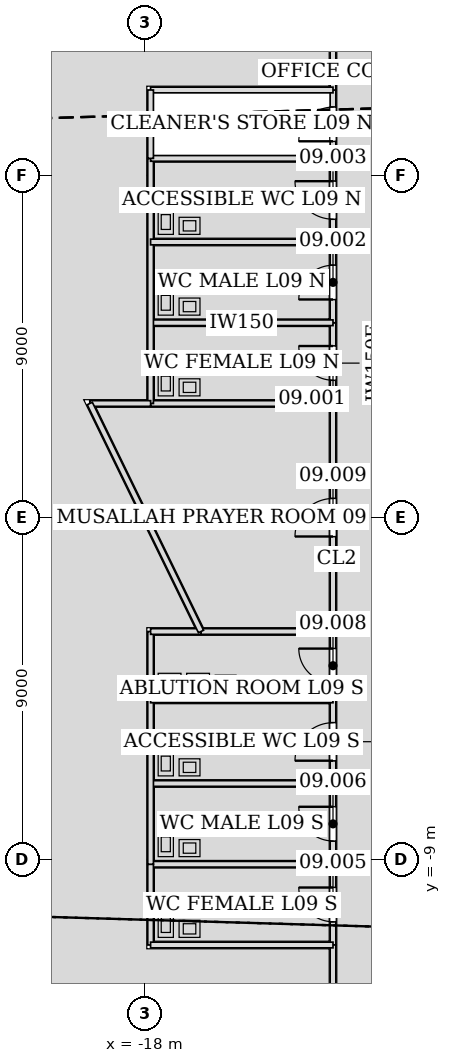
"""IFC4 building model, lengths in metres.
Left out: names, types, materials, properties, quantities, classifications, styles, units other than length and angle.
Written with IfcOpenShell. Run it as: python <this file> out.ifc"""

import sys

from ifc_helpers import new_model, si_unit, direction, frame, frame_2d, origin, place, context, subcontext, project, spatial, rectangle, extrude, element, fill, save


model = new_model("IFC4")
c1 = context("Model", 3, precision=1e-05, world=origin(), true_north=direction((0.0, 1.0)))
c2 = subcontext(c1, "Body", "Model", "MODEL_VIEW")
j1 = project(units=[si_unit("LENGTHUNIT", "METRE"), si_unit("PLANEANGLEUNIT", "RADIAN")], contexts=[c1])
p1 = place(None, origin())
s1 = spatial("IfcSite", under=j1, at=p1, CompositionType="ELEMENT")
p2 = place(p1, origin())
s2 = spatial("IfcBuilding", under=s1, at=p2, CompositionType="ELEMENT")
p3 = place(p2, frame((0.0, 0.0, 45.6)))
s3 = spatial("IfcBuildingStorey", under=s2, at=p3, CompositionType="ELEMENT", Elevation=45.6)
p4 = place(p3, frame((-13.05, 5.126, 0.0), z_axis=(0.0, 0.0, 1.0), x_axis=(0.0, -1.0, 0.0)))
e1 = element("IfcWall", 1, at=p4, inside=s3, PredefinedType="PARTITIONING", context=c2, shape_type="SweptSolid", body=[
    extrude(rectangle(XDim=2.127, YDim=0.15, at=frame_2d((1.063, 0.0))), origin(), (0.0, 0.0, 1.0), 4.035),
])
p5 = place(p4, frame((0.614, 0.0, 0.0)))
e2 = element("IfcOpeningElement", 2, at=p5, cuts=e1, PredefinedType="OPENING", context=c2, shape_type="SweptSolid", body=[
    extrude(rectangle(XDim=0.9, YDim=2.1, at=frame_2d((0.45, 1.05))), frame((0.0, 0.085, 0.0), z_axis=(0.0, -1.0, 0.0), x_axis=(1.0, 0.0, 0.0)), (0.0, 0.0, 1.0), 0.17),
])
p6 = place(p3, frame((-13.05, 7.251, 0.0), z_axis=(0.0, 0.0, 1.0), x_axis=(0.0, -1.0, 0.0)))
e3 = element("IfcWall", 3, at=p6, inside=s3, PredefinedType="PARTITIONING", context=c2, shape_type="SweptSolid", body=[
    extrude(rectangle(XDim=2.127, YDim=0.15, at=frame_2d((1.063, 0.0))), origin(), (0.0, 0.0, 1.0), 4.035),
])
p7 = place(p6, frame((0.614, 0.0, 0.0)))
e4 = element("IfcOpeningElement", 4, at=p7, cuts=e3, PredefinedType="OPENING", context=c2, shape_type="SweptSolid", body=[
    extrude(rectangle(XDim=0.9, YDim=2.1, at=frame_2d((0.45, 1.05))), frame((0.0, 0.085, 0.0), z_axis=(0.0, -1.0, 0.0), x_axis=(1.0, 0.0, 0.0)), (0.0, 0.0, 1.0), 0.17),
])
p8 = place(p3, frame((-13.05, 9.451, 0.0), z_axis=(0.0, 0.0, 1.0), x_axis=(0.0, -1.0, 0.0)))
e5 = element("IfcWall", 5, at=p8, inside=s3, PredefinedType="PARTITIONING", context=c2, shape_type="SweptSolid", body=[
    extrude(rectangle(XDim=2.202, YDim=0.15, at=frame_2d((1.101, 0.0))), origin(), (0.0, 0.0, 1.0), 4.035),
])
p9 = place(p8, frame((0.601, 0.0, 0.0)))
e6 = element("IfcOpeningElement", 6, at=p9, cuts=e5, PredefinedType="OPENING", context=c2, shape_type="SweptSolid", body=[
    extrude(rectangle(XDim=1.0, YDim=2.1, at=frame_2d((0.5, 1.05))), frame((0.0, 0.085, 0.0), z_axis=(0.0, -1.0, 0.0), x_axis=(1.0, 0.0, 0.0)), (0.0, 0.0, 1.0), 0.17),
])
p10 = place(p3, frame((-13.05, 11.251, 0.0), z_axis=(0.0, 0.0, 1.0), x_axis=(0.0, -1.0, 0.0)))
e7 = element("IfcWall", 7, at=p10, inside=s3, PredefinedType="PARTITIONING", context=c2, shape_type="SweptSolid", body=[
    extrude(rectangle(XDim=1.802, YDim=0.15, at=frame_2d((0.901, 0.0))), origin(), (0.0, 0.0, 1.0), 3.014),
])
p11 = place(p10, frame((0.451, 0.0, 0.0)))
e8 = element("IfcOpeningElement", 8, at=p11, cuts=e7, PredefinedType="OPENING", context=c2, shape_type="SweptSolid", body=[
    extrude(rectangle(XDim=0.9, YDim=2.1, at=frame_2d((0.45, 1.05))), frame((0.0, 0.085, 0.0), z_axis=(0.0, -1.0, 0.0), x_axis=(1.0, 0.0, 0.0)), (0.0, 0.0, 1.0), 0.17),
])
p12 = place(p3, frame((-13.05, -9.124, 0.0), z_axis=(0.0, 0.0, 1.0), x_axis=(0.0, -1.0, 0.0)))
e9 = element("IfcWall", 9, at=p12, inside=s3, PredefinedType="PARTITIONING", context=c2, shape_type="SweptSolid", body=[
    extrude(rectangle(XDim=2.127, YDim=0.15, at=frame_2d((1.063, 0.0))), origin(), (0.0, 0.0, 1.0), 3.014),
])
p13 = place(p12, frame((0.614, 0.0, 0.0)))
e10 = element("IfcOpeningElement", 10, at=p13, cuts=e9, PredefinedType="OPENING", context=c2, shape_type="SweptSolid", body=[
    extrude(rectangle(XDim=0.9, YDim=2.1, at=frame_2d((0.45, 1.05))), frame((0.0, 0.085, 0.0), z_axis=(0.0, -1.0, 0.0), x_axis=(1.0, 0.0, 0.0)), (0.0, 0.0, 1.0), 0.17),
])
p14 = place(p3, frame((-13.05, -6.999, 0.0), z_axis=(0.0, 0.0, 1.0), x_axis=(0.0, -1.0, 0.0)))
e11 = element("IfcWall", 11, at=p14, inside=s3, PredefinedType="PARTITIONING", context=c2, shape_type="SweptSolid", body=[
    extrude(rectangle(XDim=2.127, YDim=0.15, at=frame_2d((1.063, 0.0))), origin(), (0.0, 0.0, 1.0), 4.035),
])
p15 = place(p14, frame((0.614, 0.0, 0.0)))
e12 = element("IfcOpeningElement", 12, at=p15, cuts=e11, PredefinedType="OPENING", context=c2, shape_type="SweptSolid", body=[
    extrude(rectangle(XDim=0.9, YDim=2.1, at=frame_2d((0.45, 1.05))), frame((0.0, 0.085, 0.0), z_axis=(0.0, -1.0, 0.0), x_axis=(1.0, 0.0, 0.0)), (0.0, 0.0, 1.0), 0.17),
])
p16 = place(p3, frame((-13.05, -4.799, 0.0), z_axis=(0.0, 0.0, 1.0), x_axis=(0.0, -1.0, 0.0)))
e13 = element("IfcWall", 13, at=p16, inside=s3, PredefinedType="PARTITIONING", context=c2, shape_type="SweptSolid", body=[
    extrude(rectangle(XDim=2.202, YDim=0.15, at=frame_2d((1.101, 0.0))), origin(), (0.0, 0.0, 1.0), 4.035),
])
p17 = place(p16, frame((0.601, 0.0, 0.0)))
e14 = element("IfcOpeningElement", 14, at=p17, cuts=e13, PredefinedType="OPENING", context=c2, shape_type="SweptSolid", body=[
    extrude(rectangle(XDim=1.0, YDim=2.1, at=frame_2d((0.5, 1.05))), frame((0.0, 0.085, 0.0), z_axis=(0.0, -1.0, 0.0), x_axis=(1.0, 0.0, 0.0)), (0.0, 0.0, 1.0), 0.17),
])
p18 = place(p3, frame((-13.05, -2.999, 0.0), z_axis=(0.0, 0.0, 1.0), x_axis=(0.0, -1.0, 0.0)))
e15 = element("IfcWall", 15, at=p18, inside=s3, PredefinedType="PARTITIONING", context=c2, shape_type="SweptSolid", body=[
    extrude(rectangle(XDim=1.802, YDim=0.15, at=frame_2d((0.901, 0.0))), origin(), (0.0, 0.0, 1.0), 4.035),
])
p19 = place(p18, frame((0.451, 0.0, 0.0)))
e16 = element("IfcOpeningElement", 16, at=p19, cuts=e15, PredefinedType="OPENING", context=c2, shape_type="SweptSolid", body=[
    extrude(rectangle(XDim=0.9, YDim=2.1, at=frame_2d((0.45, 1.05))), frame((0.0, 0.085, 0.0), z_axis=(0.0, -1.0, 0.0), x_axis=(1.0, 0.0, 0.0)), (0.0, 0.0, 1.0), 0.17),
])
p20 = place(p3, frame((-13.05, 3.001, 0.0), z_axis=(0.0, 0.0, 1.0), x_axis=(0.0, -1.0, 0.0)))
e17 = element("IfcWall", 17, at=p20, inside=s3, PredefinedType="PARTITIONING", context=c2, shape_type="SweptSolid", body=[
    extrude(rectangle(XDim=6.002, YDim=0.15, at=frame_2d((3.001, 0.0))), origin(), (0.0, 0.0, 1.0), 2.983),
])
p21 = place(p20, frame((2.501, 0.0, 0.0)))
e18 = element("IfcOpeningElement", 18, at=p21, cuts=e17, PredefinedType="OPENING", context=c2, shape_type="SweptSolid", body=[
    extrude(rectangle(XDim=1.0, YDim=2.1, at=frame_2d((0.5, 1.05))), frame((0.0, 0.085, 0.0), z_axis=(0.0, -1.0, 0.0), x_axis=(1.0, 0.0, 0.0)), (0.0, 0.0, 1.0), 0.17),
])
for number, where, z_axis, x_axis in (
    (19, (-13.05, -11.249, 0.0), (0.0, 0.0, 1.0), (0.0, -1.0, 0.0)),
    (20, (-13.05, 13.05, 0.0), (0.0, 0.0, 1.0), (0.0, -1.0, 0.0)),
):
    element("IfcWall", number, at=place(p3, frame(where, z_axis=z_axis, x_axis=x_axis)), inside=s3, PredefinedType="PARTITIONING", context=c2, shape_type="SweptSolid", body=[
        extrude(rectangle(XDim=1.801, YDim=0.15, at=frame_2d((0.9, 0.0))), origin(), (0.0, 0.0, 1.0), 3.098),
    ])
for number, where, z_axis, x_axis in (
    (21, (-13.05, 5.125, 0.0), (0.0, 0.0, 1.0), (-1.0, 0.0, 0.0)),
    (22, (-17.85, 3.0, 0.0), (0.0, 0.0, 1.0), (1.0, 0.0, 0.0)),
):
    element("IfcWall", number, at=place(p3, frame(where, z_axis=z_axis, x_axis=x_axis)), inside=s3, PredefinedType="PARTITIONING", context=c2, shape_type="SweptSolid", body=[
        extrude(rectangle(XDim=4.8, YDim=0.15, at=frame_2d((2.4, 0.0))), origin(), (0.0, 0.0, 1.0), 3.426),
    ])
p22 = place(p3, frame((-17.85, 3.0, 0.0), z_axis=(0.0, 0.0, 1.0), x_axis=(0.0, 1.0, 0.0)))
e23 = element("IfcWall", 23, at=p22, inside=s3, PredefinedType="PARTITIONING", context=c2, shape_type="SweptSolid", body=[
    extrude(rectangle(XDim=6.45, YDim=0.15, at=frame_2d((3.225, 0.0))), origin(), (0.0, 0.0, 1.0), 4.035),
])
for number, where, z_axis, x_axis in (
    (24, (-13.05, 7.25, 0.0), (0.0, 0.0, 1.0), (-1.0, 0.0, 0.0)),
    (25, (-13.05, 9.45, 0.0), (0.0, 0.0, 1.0), (-1.0, 0.0, 0.0)),
):
    element("IfcWall", number, at=place(p3, frame(where, z_axis=z_axis, x_axis=x_axis)), inside=s3, PredefinedType="PARTITIONING", context=c2, shape_type="SweptSolid", body=[
        extrude(rectangle(XDim=4.8, YDim=0.15, at=frame_2d((2.4, 0.0))), origin(), (0.0, 0.0, 1.0), 3.426),
    ])
p23 = place(p3, frame((-13.05, 11.25, 0.0), z_axis=(0.0, 0.0, 1.0), x_axis=(-1.0, 0.0, 0.0)))
e26 = element("IfcWall", 26, at=p23, inside=s3, PredefinedType="PARTITIONING", context=c2, shape_type="SweptSolid", body=[
    extrude(rectangle(XDim=4.8, YDim=0.15, at=frame_2d((2.4, 0.0))), origin(), (0.0, 0.0, 1.0), 3.715),
])
p24 = place(p3, frame((-17.85, 11.25, 0.0), z_axis=(0.0, 0.0, 1.0), x_axis=(0.0, -1.0, 0.0)))
e27 = element("IfcWall", 27, at=p24, inside=s3, PredefinedType="PARTITIONING", context=c2, shape_type="SweptSolid", body=[
    extrude(rectangle(XDim=1.8, YDim=0.15, at=frame_2d((0.9, 0.0))), origin(), (0.0, 0.0, 1.0), 3.014),
])
p25 = place(p3, frame((-13.05, -9.125, 0.0), z_axis=(0.0, 0.0, 1.0), x_axis=(-1.0, 0.0, 0.0)))
e28 = element("IfcWall", 28, at=p25, inside=s3, PredefinedType="PARTITIONING", context=c2, shape_type="SweptSolid", body=[
    extrude(rectangle(XDim=4.8, YDim=0.15, at=frame_2d((2.4, 0.0))), origin(), (0.0, 0.0, 1.0), 3.426),
])
p26 = place(p3, frame((-17.85, -9.125, 0.0), z_axis=(0.0, 0.0, 1.0), x_axis=(0.0, -1.0, 0.0)))
e29 = element("IfcWall", 29, at=p26, inside=s3, PredefinedType="PARTITIONING", context=c2, shape_type="SweptSolid", body=[
    extrude(rectangle(XDim=2.125, YDim=0.15, at=frame_2d((1.062, 0.0))), origin(), (0.0, 0.0, 1.0), 3.014),
])
p27 = place(p3, frame((-17.85, -11.25, 0.0), z_axis=(0.0, 0.0, 1.0), x_axis=(1.0, 0.0, 0.0)))
e30 = element("IfcWall", 30, at=p27, inside=s3, PredefinedType="PARTITIONING", context=c2, shape_type="SweptSolid", body=[
    extrude(rectangle(XDim=4.8, YDim=0.15, at=frame_2d((2.4, 0.0))), origin(), (0.0, 0.0, 1.0), 3.715),
])
p28 = place(p3, frame((-13.05, -7.0, 0.0), z_axis=(0.0, 0.0, 1.0), x_axis=(-1.0, 0.0, 0.0)))
e31 = element("IfcWall", 31, at=p28, inside=s3, PredefinedType="PARTITIONING", context=c2, shape_type="SweptSolid", body=[
    extrude(rectangle(XDim=4.8, YDim=0.15, at=frame_2d((2.4, 0.0))), origin(), (0.0, 0.0, 1.0), 3.426),
])
p29 = place(p3, frame((-17.85, -9.125, 0.0), z_axis=(0.0, 0.0, 1.0), x_axis=(0.0, 1.0, 0.0)))
e32 = element("IfcWall", 32, at=p29, inside=s3, PredefinedType="PARTITIONING", context=c2, shape_type="SweptSolid", body=[
    extrude(rectangle(XDim=6.125, YDim=0.15, at=frame_2d((3.062, 0.0))), origin(), (0.0, 0.0, 1.0), 4.035),
])
p30 = place(p3, frame((-13.05, -4.8, 0.0), z_axis=(0.0, 0.0, 1.0), x_axis=(-1.0, 0.0, 0.0)))
e33 = element("IfcWall", 33, at=p30, inside=s3, PredefinedType="PARTITIONING", context=c2, shape_type="SweptSolid", body=[
    extrude(rectangle(XDim=4.8, YDim=0.15, at=frame_2d((2.4, 0.0))), origin(), (0.0, 0.0, 1.0), 3.426),
])
p31 = place(p3, frame((-13.05, -3.0, 0.0), z_axis=(0.0, 0.0, 1.0), x_axis=(-1.0, 0.0, 0.0)))
e34 = element("IfcWall", 34, at=p31, inside=s3, PredefinedType="PARTITIONING", context=c2, shape_type="SweptSolid", body=[
    extrude(rectangle(XDim=3.475, YDim=0.15, at=frame_2d((1.737, 0.0))), origin(), (0.0, 0.0, 1.0), 3.426),
])
p32 = place(p3, frame((-16.522, -3.0, 0.0), z_axis=(0.0, 0.0, 1.0), x_axis=(-1.0, 0.0, 0.0)))
e35 = element("IfcWall", 35, at=p32, inside=s3, PredefinedType="PARTITIONING", context=c2, shape_type="SweptSolid", body=[
    extrude(rectangle(XDim=1.328, YDim=0.15, at=frame_2d((0.664, 0.0))), origin(), (0.0, 0.0, 1.0), 4.035),
])
p33 = place(p3, frame((-17.849, 3.0, 0.0), z_axis=(0.0, 0.0, 1.0), x_axis=(-1.0, 0.0, 0.0)))
e36 = element("IfcWall", 36, at=p33, inside=s3, PredefinedType="PARTITIONING", context=c2, shape_type="SweptSolid", body=[
    extrude(rectangle(XDim=1.601, YDim=0.15, at=frame_2d((0.8, 0.0))), origin(), (0.0, 0.0, 1.0), 3.499),
])
p34 = place(p3, frame((-19.45, 3.0, 0.0), z_axis=(0.0, 0.0, 1.0), x_axis=(0.43835589904, -0.898801482963, 0.0)))
e37 = element("IfcWall", 37, at=p34, inside=s3, PredefinedType="PARTITIONING", context=c2, shape_type="SweptSolid", body=[
    extrude(rectangle(XDim=6.676, YDim=0.15, at=frame_2d((3.338, 0.0))), origin(), (0.0, 0.0, 1.0), 2.983),
])
p35 = place(p5, frame((0.9, 0.0, 0.0), z_axis=(0.0, 0.0, 1.0), x_axis=(-1.0, 0.0, 0.0)))
e38 = element("IfcDoor", 38, at=p35, inside=s3, OperationType="SINGLE_SWING_RIGHT", PredefinedType="DOOR", context=c2, shape_type="SweptSolid", body=[
    extrude(rectangle(XDim=0.9, YDim=2.1, at=frame_2d((0.45, 1.05))), frame((0.0, 0.025, 0.0), z_axis=(0.0, -1.0, 0.0), x_axis=(1.0, 0.0, 0.0)), (0.0, 0.0, 1.0), 0.05),
])
fill(e2, e38)
p36 = place(p7, frame((0.9, 0.0, 0.0), z_axis=(0.0, 0.0, 1.0), x_axis=(-1.0, 0.0, 0.0)))
e39 = element("IfcDoor", 39, at=p36, inside=s3, OperationType="SINGLE_SWING_LEFT", PredefinedType="DOOR", context=c2, shape_type="SweptSolid", body=[
    extrude(rectangle(XDim=0.9, YDim=2.1, at=frame_2d((0.45, 1.05))), frame((0.0, 0.025, 0.0), z_axis=(0.0, -1.0, 0.0), x_axis=(1.0, 0.0, 0.0)), (0.0, 0.0, 1.0), 0.05),
])
fill(e4, e39)
p37 = place(p9, frame((1.0, 0.0, 0.0), z_axis=(0.0, 0.0, 1.0), x_axis=(-1.0, 0.0, 0.0)))
e40 = element("IfcDoor", 40, at=p37, inside=s3, OperationType="SINGLE_SWING_RIGHT", PredefinedType="DOOR", context=c2, shape_type="SweptSolid", body=[
    extrude(rectangle(XDim=1.0, YDim=2.1, at=frame_2d((0.5, 1.05))), frame((0.0, 0.025, 0.0), z_axis=(0.0, -1.0, 0.0), x_axis=(1.0, 0.0, 0.0)), (0.0, 0.0, 1.0), 0.05),
])
fill(e6, e40)
p38 = place(p11, frame((0.9, 0.0, 0.0), z_axis=(0.0, 0.0, 1.0), x_axis=(-1.0, 0.0, 0.0)))
e41 = element("IfcDoor", 41, at=p38, inside=s3, OperationType="SINGLE_SWING_LEFT", PredefinedType="DOOR", context=c2, shape_type="SweptSolid", body=[
    extrude(rectangle(XDim=0.9, YDim=2.1, at=frame_2d((0.45, 1.05))), frame((0.0, 0.025, 0.0), z_axis=(0.0, -1.0, 0.0), x_axis=(1.0, 0.0, 0.0)), (0.0, 0.0, 1.0), 0.05),
])
fill(e8, e41)
p39 = place(p13, frame((0.9, 0.0, 0.0), z_axis=(0.0, 0.0, 1.0), x_axis=(-1.0, 0.0, 0.0)))
e42 = element("IfcDoor", 42, at=p39, inside=s3, OperationType="SINGLE_SWING_RIGHT", PredefinedType="DOOR", context=c2, shape_type="SweptSolid", body=[
    extrude(rectangle(XDim=0.9, YDim=2.1, at=frame_2d((0.45, 1.05))), frame((0.0, 0.025, 0.0), z_axis=(0.0, -1.0, 0.0), x_axis=(1.0, 0.0, 0.0)), (0.0, 0.0, 1.0), 0.05),
])
fill(e10, e42)
p40 = place(p15, frame((0.9, 0.0, 0.0), z_axis=(0.0, 0.0, 1.0), x_axis=(-1.0, 0.0, 0.0)))
e43 = element("IfcDoor", 43, at=p40, inside=s3, OperationType="SINGLE_SWING_RIGHT", PredefinedType="DOOR", context=c2, shape_type="SweptSolid", body=[
    extrude(rectangle(XDim=0.9, YDim=2.1, at=frame_2d((0.45, 1.05))), frame((0.0, 0.025, 0.0), z_axis=(0.0, -1.0, 0.0), x_axis=(1.0, 0.0, 0.0)), (0.0, 0.0, 1.0), 0.05),
])
fill(e12, e43)
p41 = place(p17, frame((1.0, 0.0, 0.0), z_axis=(0.0, 0.0, 1.0), x_axis=(-1.0, 0.0, 0.0)))
e44 = element("IfcDoor", 44, at=p41, inside=s3, OperationType="SINGLE_SWING_LEFT", PredefinedType="DOOR", context=c2, shape_type="SweptSolid", body=[
    extrude(rectangle(XDim=1.0, YDim=2.1, at=frame_2d((0.5, 1.05))), frame((0.0, 0.025, 0.0), z_axis=(0.0, -1.0, 0.0), x_axis=(1.0, 0.0, 0.0)), (0.0, 0.0, 1.0), 0.05),
])
fill(e14, e44)
p42 = place(p19, frame((0.9, 0.0, 0.0), z_axis=(0.0, 0.0, 1.0), x_axis=(-1.0, 0.0, 0.0)))
e45 = element("IfcDoor", 45, at=p42, inside=s3, OperationType="SINGLE_SWING_RIGHT", PredefinedType="DOOR", context=c2, shape_type="SweptSolid", body=[
    extrude(rectangle(XDim=0.9, YDim=2.1, at=frame_2d((0.45, 1.05))), frame((0.0, 0.025, 0.0), z_axis=(0.0, -1.0, 0.0), x_axis=(1.0, 0.0, 0.0)), (0.0, 0.0, 1.0), 0.05),
])
fill(e16, e45)
p43 = place(p21, frame((1.0, 0.0, 0.0), z_axis=(0.0, 0.0, 1.0), x_axis=(-1.0, 0.0, 0.0)))
e46 = element("IfcDoor", 46, at=p43, inside=s3, OperationType="SINGLE_SWING_LEFT", PredefinedType="DOOR", context=c2, shape_type="SweptSolid", body=[
    extrude(rectangle(XDim=1.0, YDim=2.1, at=frame_2d((0.5, 1.05))), frame((0.0, 0.025, 0.0), z_axis=(0.0, -1.0, 0.0), x_axis=(1.0, 0.0, 0.0)), (0.0, 0.0, 1.0), 0.05),
])
fill(e18, e46)
save(model, sys.argv[1])
